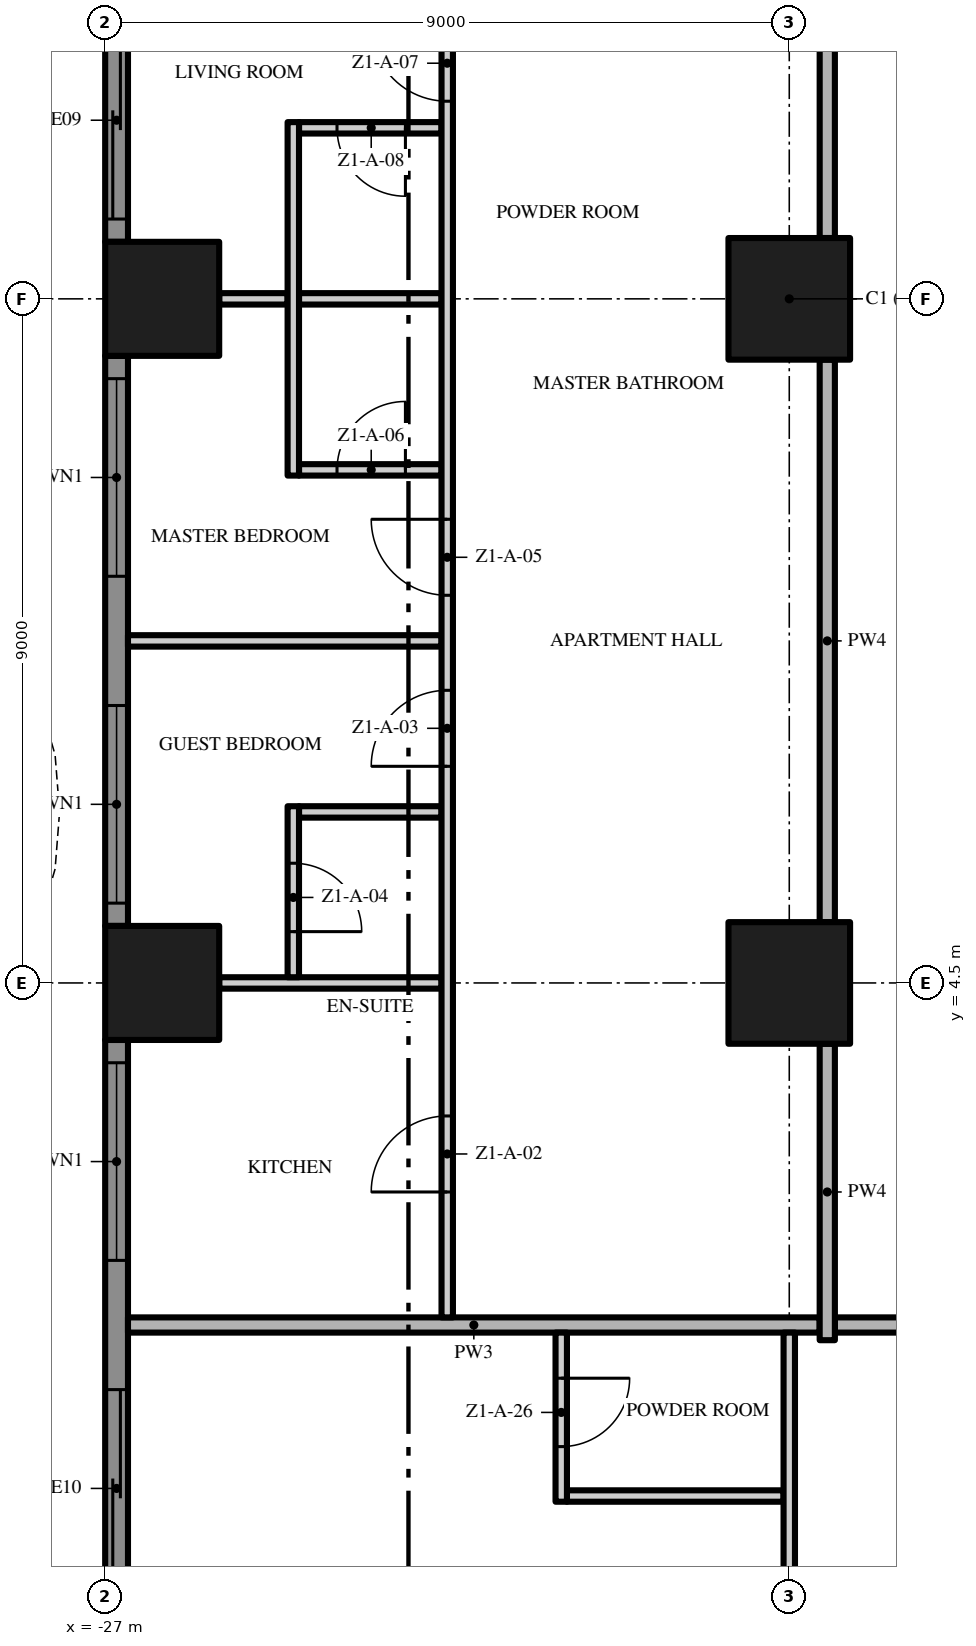
"""IFC4 building model, lengths in metres.
Left out: names, types, materials, properties, quantities, classifications, styles, units other than length and angle.
Written with IfcOpenShell. Run it as: python <this file> out.ifc"""

import sys

from ifc_helpers import new_model, si_unit, direction, frame, frame_2d, origin, origin_2d, place, context, subcontext, project, spatial, polyline, rectangle, outline, extrude, element, fill, save


model = new_model("IFC4")
c1 = context("Model", 3, precision=1e-05, world=origin(), true_north=direction((0.0, 1.0)))
c2 = subcontext(c1, "Body", "Model", "MODEL_VIEW")
j1 = project(units=[si_unit("LENGTHUNIT", "METRE"), si_unit("PLANEANGLEUNIT", "RADIAN")], contexts=[c1])
p1 = place(None, origin())
s1 = spatial("IfcSite", under=j1, at=p1, CompositionType="ELEMENT")
p2 = place(p1, origin())
s2 = spatial("IfcBuilding", under=s1, at=p2, CompositionType="ELEMENT")
p3 = place(p2, frame((0.0, 0.0, 15.0)))
s3 = spatial("IfcBuildingStorey", under=s2, at=p3, CompositionType="ELEMENT", Elevation=15.0)
for number, where, z_axis, x_axis in (
    (1, (-18.0, 13.5, 0.0), (0.0, 0.0, 1.0), (1.0, 0.0, 0.0)),
    (2, (-18.0, 4.5, 0.0), (0.0, 0.0, 1.0), (1.0, 0.0, 0.0)),
):
    element("IfcColumn", number, at=place(p3, frame(where, z_axis=z_axis, x_axis=x_axis)), inside=s3, PredefinedType="COLUMN", context=c2, shape_type="SweptSolid", body=[
        extrude(rectangle(XDim=1.6, YDim=1.6, at=origin_2d()), origin(), (0.0, 0.0, 1.0), 3.5),
    ])
for number, where, z_axis, x_axis in (
    (3, (-26.25, 13.5, 0.0), (0.0, 0.0, 1.0), (1.0, 0.0, 0.0)),
    (4, (-26.25, 4.5, 0.0), (0.0, 0.0, 1.0), (1.0, 0.0, 0.0)),
):
    element("IfcColumn", number, at=place(p3, frame(where, z_axis=z_axis, x_axis=x_axis)), inside=s3, PredefinedType="COLUMN", context=c2, shape_type="SweptSolid", body=[
        extrude(rectangle(XDim=1.5, YDim=1.5, at=origin_2d()), origin(), (0.0, 0.0, 1.0), 3.5),
    ])
p4 = place(p3, frame((-26.85, 14.25, 0.0), z_axis=(0.0, 0.0, 1.0), x_axis=(0.0, 1.0, 0.0)))
e5 = element("IfcWall", 5, at=p4, inside=s3, PredefinedType="SOLIDWALL", context=c2, shape_type="SweptSolid", body=[
    extrude(rectangle(XDim=3.45, YDim=0.3, at=frame_2d((1.725, 0.0))), origin(), (0.0, 0.0, 1.0), 3.5),
])
p5 = place(p4, frame((0.3, 0.0, 0.0)))
e6 = element("IfcOpeningElement", 6, at=p5, cuts=e5, PredefinedType="OPENING", context=c2, shape_type="SweptSolid", body=[
    extrude(rectangle(XDim=2.6, YDim=2.4, at=frame_2d((1.3, 1.2))), frame((0.0, 0.16, 0.0), z_axis=(0.0, -1.0, 0.0), x_axis=(1.0, 0.0, 0.0)), (0.0, 0.0, 1.0), 0.32),
])
p6 = place(p3, frame((-26.85, 5.25, 0.0), z_axis=(0.0, 0.0, 1.0), x_axis=(0.0, 1.0, 0.0)))
e7 = element("IfcWall", 7, at=p6, inside=s3, PredefinedType="SOLIDWALL", context=c2, shape_type="SweptSolid", body=[
    extrude(rectangle(XDim=7.5, YDim=0.3, at=frame_2d((3.75, 0.0))), origin(), (0.0, 0.0, 1.0), 3.5),
])
p7 = place(p6, frame((4.6, 0.0, 0.45)))
e8 = element("IfcOpeningElement", 8, at=p7, cuts=e7, PredefinedType="OPENING", context=c2, shape_type="SweptSolid", body=[
    extrude(rectangle(XDim=2.6, YDim=2.65, at=frame_2d((1.3, 1.325))), frame((0.0, 0.16, 0.0), z_axis=(0.0, -1.0, 0.0), x_axis=(1.0, 0.0, 0.0)), (0.0, 0.0, 1.0), 0.32),
])
p8 = place(p6, frame((0.3, 0.0, 0.45)))
e9 = element("IfcOpeningElement", 9, at=p8, cuts=e7, PredefinedType="OPENING", context=c2, shape_type="SweptSolid", body=[
    extrude(rectangle(XDim=2.6, YDim=2.65, at=frame_2d((1.3, 1.325))), frame((0.0, 0.16, 0.0), z_axis=(0.0, -1.0, 0.0), x_axis=(1.0, 0.0, 0.0)), (0.0, 0.0, 1.0), 0.32),
])
p9 = place(p3, frame((-26.85, -3.75, 0.0), z_axis=(0.0, 0.0, 1.0), x_axis=(0.0, 1.0, 0.0)))
e10 = element("IfcWall", 10, at=p9, inside=s3, PredefinedType="SOLIDWALL", context=c2, shape_type="SweptSolid", body=[
    extrude(rectangle(XDim=7.5, YDim=0.3, at=frame_2d((3.75, 0.0))), origin(), (0.0, 0.0, 1.0), 3.5),
])
p10 = place(p9, frame((4.6, 0.0, 0.45)))
e11 = element("IfcOpeningElement", 11, at=p10, cuts=e10, PredefinedType="OPENING", context=c2, shape_type="SweptSolid", body=[
    extrude(rectangle(XDim=2.6, YDim=2.65, at=frame_2d((1.3, 1.325))), frame((0.0, 0.16, 0.0), z_axis=(0.0, -1.0, 0.0), x_axis=(1.0, 0.0, 0.0)), (0.0, 0.0, 1.0), 0.32),
])
p11 = place(p9, frame((0.3, 0.0, 0.0)))
e12 = element("IfcOpeningElement", 12, at=p11, cuts=e10, PredefinedType="OPENING", context=c2, shape_type="SweptSolid", body=[
    extrude(rectangle(XDim=2.6, YDim=2.4, at=frame_2d((1.3, 1.2))), frame((0.0, 0.16, 0.0), z_axis=(0.0, -1.0, 0.0), x_axis=(1.0, 0.0, 0.0)), (0.0, 0.0, 1.0), 0.32),
])
p12 = place(p3, origin())
e13 = element("IfcWall", 13, at=p12, inside=s3, PredefinedType="USERDEFINED", context=c2, shape_type="SweptSolid", body=[
    extrude(outline(polyline([(-28.8, 18.0), (-29.505, 16.5), (-29.941, 15.0), (-30.0, 14.25), (-29.941, 13.5), (-29.505, 12.0), (-28.8, 10.5), (-28.095, 9.0), (-27.659, 7.5), (-27.6, 6.75), (-27.659, 6.0), (-28.095, 4.5), (-28.8, 3.0), (-29.505, 1.5), (-29.941, 0.0), (-30.0, -0.75), (-29.941, -1.5), (-29.505, -3.0), (-28.8, -4.5), (-28.095, -6.0), (-27.659, -7.5), (-27.6, -8.25), (-27.659, -9.0), (-28.095, -10.5), (-28.8, -12.0), (-29.505, -13.5), (-29.941, -15.0), (-30.0, -15.75), (-29.941, -16.5), (-29.505, -18.0), (-29.265, -17.93), (-29.694, -16.455), (-29.749, -15.75), (-29.694, -15.045), (-29.271, -13.589), (-28.574, -12.106), (-27.86, -10.589), (-27.411, -9.045), (-27.349, -8.25), (-27.411, -7.455), (-27.86, -5.911), (-28.574, -4.394), (-29.271, -2.911), (-29.694, -1.455), (-29.749, -0.75), (-29.694, -0.045), (-29.271, 1.411), (-28.574, 2.894), (-27.86, 4.411), (-27.411, 5.955), (-27.349, 6.75), (-27.411, 7.545), (-27.86, 9.089), (-28.574, 10.606), (-29.271, 12.089), (-29.694, 13.545), (-29.749, 14.25), (-29.694, 14.955), (-29.271, 16.411), (-28.574, 17.894), (-28.8, 18.0)])), origin(), (0.0, 0.0, 1.0), 0.9),
])
p13 = place(p3, frame((-20.925, -2.25, 0.0), z_axis=(0.0, 0.0, 1.0), x_axis=(1.0, 0.0, 0.0)))
e14 = element("IfcWall", 14, at=p13, inside=s3, PredefinedType="PARTITIONING", context=c2, shape_type="SweptSolid", body=[
    extrude(rectangle(XDim=2.85, YDim=0.15, at=frame_2d((1.425, 0.0))), origin(), (0.0, 0.0, 1.0), 3.5),
])
p14 = place(p3, frame((-17.4, 0.0, 0.0), z_axis=(0.0, 0.0, 1.0), x_axis=(1.0, 0.0, 0.0)))
e15 = element("IfcWall", 15, at=p14, inside=s3, PredefinedType="PARTITIONING", context=c2, shape_type="SweptSolid", body=[
    extrude(rectangle(XDim=12.8, YDim=0.2, at=frame_2d((6.4, 0.0))), origin(), (0.0, 0.0, 1.0), 3.5),
])
p15 = place(p3, frame((-26.7, 0.0, 0.0), z_axis=(0.0, 0.0, 1.0), x_axis=(1.0, 0.0, 0.0)))
e16 = element("IfcWall", 16, at=p15, inside=s3, PredefinedType="PARTITIONING", context=c2, shape_type="SweptSolid", body=[
    extrude(rectangle(XDim=9.1, YDim=0.2, at=frame_2d((4.55, 0.0))), origin(), (0.0, 0.0, 1.0), 3.5),
])
p16 = place(p3, frame((-25.5, 4.5, 0.0), z_axis=(0.0, 0.0, 1.0), x_axis=(1.0, 0.0, 0.0)))
e17 = element("IfcWall", 17, at=p16, inside=s3, PredefinedType="PARTITIONING", context=c2, shape_type="SweptSolid", body=[
    extrude(rectangle(XDim=2.925, YDim=0.15, at=frame_2d((1.462, 0.0))), origin(), (0.0, 0.0, 1.0), 3.5),
])
p17 = place(p3, frame((-24.45, 6.75, 0.0), z_axis=(0.0, 0.0, 1.0), x_axis=(1.0, 0.0, 0.0)))
e18 = element("IfcWall", 18, at=p17, inside=s3, PredefinedType="PARTITIONING", context=c2, shape_type="SweptSolid", body=[
    extrude(rectangle(XDim=1.875, YDim=0.15, at=frame_2d((0.938, 0.0))), origin(), (0.0, 0.0, 1.0), 3.5),
])
p18 = place(p3, frame((-26.7, 9.0, 0.0), z_axis=(0.0, 0.0, 1.0), x_axis=(1.0, 0.0, 0.0)))
e19 = element("IfcWall", 19, at=p18, inside=s3, PredefinedType="PARTITIONING", context=c2, shape_type="SweptSolid", body=[
    extrude(rectangle(XDim=4.125, YDim=0.15, at=frame_2d((2.062, 0.0))), origin(), (0.0, 0.0, 1.0), 3.5),
])
p19 = place(p3, frame((-24.45, 11.25, 0.0), z_axis=(0.0, 0.0, 1.0), x_axis=(1.0, 0.0, 0.0)))
e20 = element("IfcWall", 20, at=p19, inside=s3, PredefinedType="PARTITIONING", context=c2, shape_type="SweptSolid", body=[
    extrude(rectangle(XDim=1.875, YDim=0.15, at=frame_2d((0.938, 0.0))), origin(), (0.0, 0.0, 1.0), 3.5),
])
p20 = place(p19, frame((0.5, 0.0, 0.0)))
e21 = element("IfcOpeningElement", 21, at=p20, cuts=e20, PredefinedType="OPENING", context=c2, shape_type="SweptSolid", body=[
    extrude(rectangle(XDim=0.9, YDim=2.1, at=frame_2d((0.45, 1.05))), frame((0.0, 0.085, 0.0), z_axis=(0.0, -1.0, 0.0), x_axis=(1.0, 0.0, 0.0)), (0.0, 0.0, 1.0), 0.17),
])
p21 = place(p3, frame((-25.5, 13.5, 0.0), z_axis=(0.0, 0.0, 1.0), x_axis=(1.0, 0.0, 0.0)))
e22 = element("IfcWall", 22, at=p21, inside=s3, PredefinedType="PARTITIONING", context=c2, shape_type="SweptSolid", body=[
    extrude(rectangle(XDim=0.9, YDim=0.15, at=frame_2d((0.45, 0.0))), origin(), (0.0, 0.0, 1.0), 3.5),
])
p22 = place(p3, frame((-24.45, 13.5, 0.0), z_axis=(0.0, 0.0, 1.0), x_axis=(1.0, 0.0, 0.0)))
e23 = element("IfcWall", 23, at=p22, inside=s3, PredefinedType="PARTITIONING", context=c2, shape_type="SweptSolid", body=[
    extrude(rectangle(XDim=1.875, YDim=0.15, at=frame_2d((0.938, 0.0))), origin(), (0.0, 0.0, 1.0), 3.5),
])
p23 = place(p3, frame((-22.575, 15.75, 0.0), z_axis=(0.0, 0.0, 1.0), x_axis=(-1.0, 0.0, 0.0)))
e24 = element("IfcWall", 24, at=p23, inside=s3, PredefinedType="PARTITIONING", context=c2, shape_type="SweptSolid", body=[
    extrude(rectangle(XDim=1.875, YDim=0.15, at=frame_2d((0.938, 0.0))), origin(), (0.0, 0.0, 1.0), 3.5),
])
p24 = place(p23, frame((0.475, 0.0, 0.0)))
e25 = element("IfcOpeningElement", 25, at=p24, cuts=e24, PredefinedType="OPENING", context=c2, shape_type="SweptSolid", body=[
    extrude(rectangle(XDim=0.9, YDim=2.1, at=frame_2d((0.45, 1.05))), frame((0.0, 0.085, 0.0), z_axis=(0.0, -1.0, 0.0), x_axis=(1.0, 0.0, 0.0)), (0.0, 0.0, 1.0), 0.17),
])
p25 = place(p3, frame((-24.525, 6.825, 0.0), z_axis=(0.0, 0.0, 1.0), x_axis=(0.0, -1.0, 0.0)))
e26 = element("IfcWall", 26, at=p25, inside=s3, PredefinedType="PARTITIONING", context=c2, shape_type="SweptSolid", body=[
    extrude(rectangle(XDim=2.25, YDim=0.15, at=frame_2d((1.125, 0.0))), origin(), (0.0, 0.0, 1.0), 3.5),
])
p26 = place(p25, frame((0.75, 0.0, 0.0)))
e27 = element("IfcOpeningElement", 27, at=p26, cuts=e26, PredefinedType="OPENING", context=c2, shape_type="SweptSolid", body=[
    extrude(rectangle(XDim=0.9, YDim=2.1, at=frame_2d((0.45, 1.05))), frame((0.0, 0.085, 0.0), z_axis=(0.0, -1.0, 0.0), x_axis=(1.0, 0.0, 0.0)), (0.0, 0.0, 1.0), 0.17),
])
p27 = place(p3, frame((-24.525, 11.175, 0.0), z_axis=(0.0, 0.0, 1.0), x_axis=(0.0, 1.0, 0.0)))
e28 = element("IfcWall", 28, at=p27, inside=s3, PredefinedType="PARTITIONING", context=c2, shape_type="SweptSolid", body=[
    extrude(rectangle(XDim=4.65, YDim=0.15, at=frame_2d((2.325, 0.0))), origin(), (0.0, 0.0, 1.0), 3.5),
])
p28 = place(p3, frame((-22.5, 0.1, 0.0), z_axis=(0.0, 0.0, 1.0), x_axis=(0.0, 1.0, 0.0)))
e29 = element("IfcWall", 29, at=p28, inside=s3, PredefinedType="PARTITIONING", context=c2, shape_type="SweptSolid", body=[
    extrude(rectangle(XDim=17.15, YDim=0.15, at=frame_2d((8.575, 0.0))), origin(), (0.0, 0.0, 1.0), 3.5),
])
p29 = place(p28, frame((1.65, 0.0, 0.0)))
e30 = element("IfcOpeningElement", 30, at=p29, cuts=e29, PredefinedType="OPENING", context=c2, shape_type="SweptSolid", body=[
    extrude(rectangle(XDim=1.0, YDim=2.4, at=frame_2d((0.5, 1.2))), frame((0.0, 0.085, 0.0), z_axis=(0.0, -1.0, 0.0), x_axis=(1.0, 0.0, 0.0)), (0.0, 0.0, 1.0), 0.17),
])
p30 = place(p28, frame((7.25, 0.0, 0.0)))
e31 = element("IfcOpeningElement", 31, at=p30, cuts=e29, PredefinedType="OPENING", context=c2, shape_type="SweptSolid", body=[
    extrude(rectangle(XDim=1.0, YDim=2.4, at=frame_2d((0.5, 1.2))), frame((0.0, 0.085, 0.0), z_axis=(0.0, -1.0, 0.0), x_axis=(1.0, 0.0, 0.0)), (0.0, 0.0, 1.0), 0.17),
])
p31 = place(p28, frame((9.5, 0.0, 0.0)))
e32 = element("IfcOpeningElement", 32, at=p31, cuts=e29, PredefinedType="OPENING", context=c2, shape_type="SweptSolid", body=[
    extrude(rectangle(XDim=1.0, YDim=2.4, at=frame_2d((0.5, 1.2))), frame((0.0, 0.085, 0.0), z_axis=(0.0, -1.0, 0.0), x_axis=(1.0, 0.0, 0.0)), (0.0, 0.0, 1.0), 0.17),
])
p32 = place(p28, frame((16.0, 0.0, 0.0)))
e33 = element("IfcOpeningElement", 33, at=p32, cuts=e29, PredefinedType="OPENING", context=c2, shape_type="SweptSolid", body=[
    extrude(rectangle(XDim=1.0, YDim=2.4, at=frame_2d((0.5, 1.2))), frame((0.0, 0.085, 0.0), z_axis=(0.0, -1.0, 0.0), x_axis=(1.0, 0.0, 0.0)), (0.0, 0.0, 1.0), 0.17),
])
p33 = place(p3, frame((-21.0, -0.1, 0.0), z_axis=(0.0, 0.0, 1.0), x_axis=(0.0, -1.0, 0.0)))
e34 = element("IfcWall", 34, at=p33, inside=s3, PredefinedType="PARTITIONING", context=c2, shape_type="SweptSolid", body=[
    extrude(rectangle(XDim=2.225, YDim=0.15, at=frame_2d((1.113, 0.0))), origin(), (0.0, 0.0, 1.0), 3.5),
])
p34 = place(p33, frame((0.6, 0.0, 0.0)))
e35 = element("IfcOpeningElement", 35, at=p34, cuts=e34, PredefinedType="OPENING", context=c2, shape_type="SweptSolid", body=[
    extrude(rectangle(XDim=0.9, YDim=2.1, at=frame_2d((0.45, 1.05))), frame((0.0, 0.085, 0.0), z_axis=(0.0, -1.0, 0.0), x_axis=(1.0, 0.0, 0.0)), (0.0, 0.0, 1.0), 0.17),
])
p35 = place(p3, frame((-18.0, -3.7, 0.0), z_axis=(0.0, 0.0, 1.0), x_axis=(0.0, 1.0, 0.0)))
e36 = element("IfcWall", 36, at=p35, inside=s3, PredefinedType="PARTITIONING", context=c2, shape_type="SweptSolid", body=[
    extrude(rectangle(XDim=3.6, YDim=0.15, at=frame_2d((1.8, 0.0))), origin(), (0.0, 0.0, 1.0), 3.5),
])
p36 = place(p3, frame((-17.5, -0.2, 0.0), z_axis=(0.0, 0.0, 1.0), x_axis=(0.0, 1.0, 0.0)))
e37 = element("IfcWall", 37, at=p36, inside=s3, PredefinedType="PARTITIONING", context=c2, shape_type="SweptSolid", body=[
    extrude(rectangle(XDim=3.9, YDim=0.2, at=frame_2d((1.95, 0.0))), origin(), (0.0, 0.0, 1.0), 3.5),
])
p37 = place(p3, frame((-17.5, 5.3, 0.0), z_axis=(0.0, 0.0, 1.0), x_axis=(0.0, 1.0, 0.0)))
e38 = element("IfcWall", 38, at=p37, inside=s3, PredefinedType="PARTITIONING", context=c2, shape_type="SweptSolid", body=[
    extrude(rectangle(XDim=7.4, YDim=0.2, at=frame_2d((3.7, 0.0))), origin(), (0.0, 0.0, 1.0), 3.5),
])
p38 = place(p3, frame((-17.5, 14.3, 0.0), z_axis=(0.0, 0.0, 1.0), x_axis=(0.0, 1.0, 0.0)))
e39 = element("IfcWall", 39, at=p38, inside=s3, PredefinedType="PARTITIONING", context=c2, shape_type="SweptSolid", body=[
    extrude(rectangle(XDim=6.7, YDim=0.2, at=frame_2d((3.35, 0.0))), origin(), (0.0, 0.0, 1.0), 3.5),
])
p39 = place(p38, frame((3.1, 0.0, 0.0)))
e40 = element("IfcOpeningElement", 40, at=p39, cuts=e39, PredefinedType="OPENING", context=c2, shape_type="SweptSolid", body=[
    extrude(rectangle(XDim=1.2, YDim=2.4, at=frame_2d((0.6, 1.2))), frame((0.0, 0.11, 0.0), z_axis=(0.0, -1.0, 0.0), x_axis=(1.0, 0.0, 0.0)), (0.0, 0.0, 1.0), 0.22),
])
p40 = place(p5, origin())
e41 = element("IfcDoor", 41, at=p40, inside=s3, OperationType="SINGLE_SWING_LEFT", PredefinedType="DOOR", context=c2, shape_type="SweptSolid", body=[
    extrude(rectangle(XDim=2.6, YDim=2.4, at=frame_2d((1.3, 1.2))), frame((0.0, 0.025, 0.0), z_axis=(0.0, -1.0, 0.0), x_axis=(1.0, 0.0, 0.0)), (0.0, 0.0, 1.0), 0.05),
])
fill(e6, e41)
p41 = place(p7, origin())
e42 = element("IfcWindow", 42, at=p41, inside=s3, PartitioningType="SINGLE_PANEL", PredefinedType="WINDOW", context=c2, shape_type="SweptSolid", body=[
    extrude(rectangle(XDim=2.6, YDim=2.65, at=frame_2d((1.3, 1.325))), frame((0.0, 0.03, 0.0), z_axis=(0.0, -1.0, 0.0), x_axis=(1.0, 0.0, 0.0)), (0.0, 0.0, 1.0), 0.06),
])
fill(e8, e42)
p42 = place(p8, origin())
e43 = element("IfcWindow", 43, at=p42, inside=s3, PartitioningType="SINGLE_PANEL", PredefinedType="WINDOW", context=c2, shape_type="SweptSolid", body=[
    extrude(rectangle(XDim=2.6, YDim=2.65, at=frame_2d((1.3, 1.325))), frame((0.0, 0.03, 0.0), z_axis=(0.0, -1.0, 0.0), x_axis=(1.0, 0.0, 0.0)), (0.0, 0.0, 1.0), 0.06),
])
fill(e9, e43)
p43 = place(p10, origin())
e44 = element("IfcWindow", 44, at=p43, inside=s3, PartitioningType="SINGLE_PANEL", PredefinedType="WINDOW", context=c2, shape_type="SweptSolid", body=[
    extrude(rectangle(XDim=2.6, YDim=2.65, at=frame_2d((1.3, 1.325))), frame((0.0, 0.03, 0.0), z_axis=(0.0, -1.0, 0.0), x_axis=(1.0, 0.0, 0.0)), (0.0, 0.0, 1.0), 0.06),
])
fill(e11, e44)
p44 = place(p11, origin())
e45 = element("IfcDoor", 45, at=p44, inside=s3, OperationType="SINGLE_SWING_LEFT", PredefinedType="DOOR", context=c2, shape_type="SweptSolid", body=[
    extrude(rectangle(XDim=2.6, YDim=2.4, at=frame_2d((1.3, 1.2))), frame((0.0, 0.025, 0.0), z_axis=(0.0, -1.0, 0.0), x_axis=(1.0, 0.0, 0.0)), (0.0, 0.0, 1.0), 0.05),
])
fill(e12, e45)
p45 = place(p29, origin())
e46 = element("IfcDoor", 46, at=p45, inside=s3, OperationType="SINGLE_SWING_LEFT", PredefinedType="DOOR", context=c2, shape_type="SweptSolid", body=[
    extrude(rectangle(XDim=1.0, YDim=2.4, at=frame_2d((0.5, 1.2))), frame((0.0, 0.025, 0.0), z_axis=(0.0, -1.0, 0.0), x_axis=(1.0, 0.0, 0.0)), (0.0, 0.0, 1.0), 0.05),
])
fill(e30, e46)
p46 = place(p30, origin())
e47 = element("IfcDoor", 47, at=p46, inside=s3, OperationType="SINGLE_SWING_LEFT", PredefinedType="DOOR", context=c2, shape_type="SweptSolid", body=[
    extrude(rectangle(XDim=1.0, YDim=2.4, at=frame_2d((0.5, 1.2))), frame((0.0, 0.025, 0.0), z_axis=(0.0, -1.0, 0.0), x_axis=(1.0, 0.0, 0.0)), (0.0, 0.0, 1.0), 0.05),
])
fill(e31, e47)
p47 = place(p26, origin())
e48 = element("IfcDoor", 48, at=p47, inside=s3, OperationType="SINGLE_SWING_RIGHT", PredefinedType="DOOR", context=c2, shape_type="SweptSolid", body=[
    extrude(rectangle(XDim=0.9, YDim=2.1, at=frame_2d((0.45, 1.05))), frame((0.0, 0.025, 0.0), z_axis=(0.0, -1.0, 0.0), x_axis=(1.0, 0.0, 0.0)), (0.0, 0.0, 1.0), 0.05),
])
fill(e27, e48)
p48 = place(p31, origin())
e49 = element("IfcDoor", 49, at=p48, inside=s3, OperationType="SINGLE_SWING_RIGHT", PredefinedType="DOOR", context=c2, shape_type="SweptSolid", body=[
    extrude(rectangle(XDim=1.0, YDim=2.4, at=frame_2d((0.5, 1.2))), frame((0.0, 0.025, 0.0), z_axis=(0.0, -1.0, 0.0), x_axis=(1.0, 0.0, 0.0)), (0.0, 0.0, 1.0), 0.05),
])
fill(e32, e49)
p49 = place(p20, origin())
e50 = element("IfcDoor", 50, at=p49, inside=s3, OperationType="SINGLE_SWING_RIGHT", PredefinedType="DOOR", context=c2, shape_type="SweptSolid", body=[
    extrude(rectangle(XDim=0.9, YDim=2.1, at=frame_2d((0.45, 1.05))), frame((0.0, 0.025, 0.0), z_axis=(0.0, -1.0, 0.0), x_axis=(1.0, 0.0, 0.0)), (0.0, 0.0, 1.0), 0.05),
])
fill(e21, e50)
p50 = place(p32, origin())
e51 = element("IfcDoor", 51, at=p50, inside=s3, OperationType="SINGLE_SWING_RIGHT", PredefinedType="DOOR", context=c2, shape_type="SweptSolid", body=[
    extrude(rectangle(XDim=1.0, YDim=2.4, at=frame_2d((0.5, 1.2))), frame((0.0, 0.025, 0.0), z_axis=(0.0, -1.0, 0.0), x_axis=(1.0, 0.0, 0.0)), (0.0, 0.0, 1.0), 0.05),
])
fill(e33, e51)
p51 = place(p24, origin())
e52 = element("IfcDoor", 52, at=p51, inside=s3, OperationType="SINGLE_SWING_LEFT", PredefinedType="DOOR", context=c2, shape_type="SweptSolid", body=[
    extrude(rectangle(XDim=0.9, YDim=2.1, at=frame_2d((0.45, 1.05))), frame((0.0, 0.025, 0.0), z_axis=(0.0, -1.0, 0.0), x_axis=(1.0, 0.0, 0.0)), (0.0, 0.0, 1.0), 0.05),
])
fill(e25, e52)
p52 = place(p34, origin())
e53 = element("IfcDoor", 53, at=p52, inside=s3, OperationType="SINGLE_SWING_LEFT", PredefinedType="DOOR", context=c2, shape_type="SweptSolid", body=[
    extrude(rectangle(XDim=0.9, YDim=2.1, at=frame_2d((0.45, 1.05))), frame((0.0, 0.025, 0.0), z_axis=(0.0, -1.0, 0.0), x_axis=(1.0, 0.0, 0.0)), (0.0, 0.0, 1.0), 0.05),
])
fill(e35, e53)
save(model, sys.argv[1])
